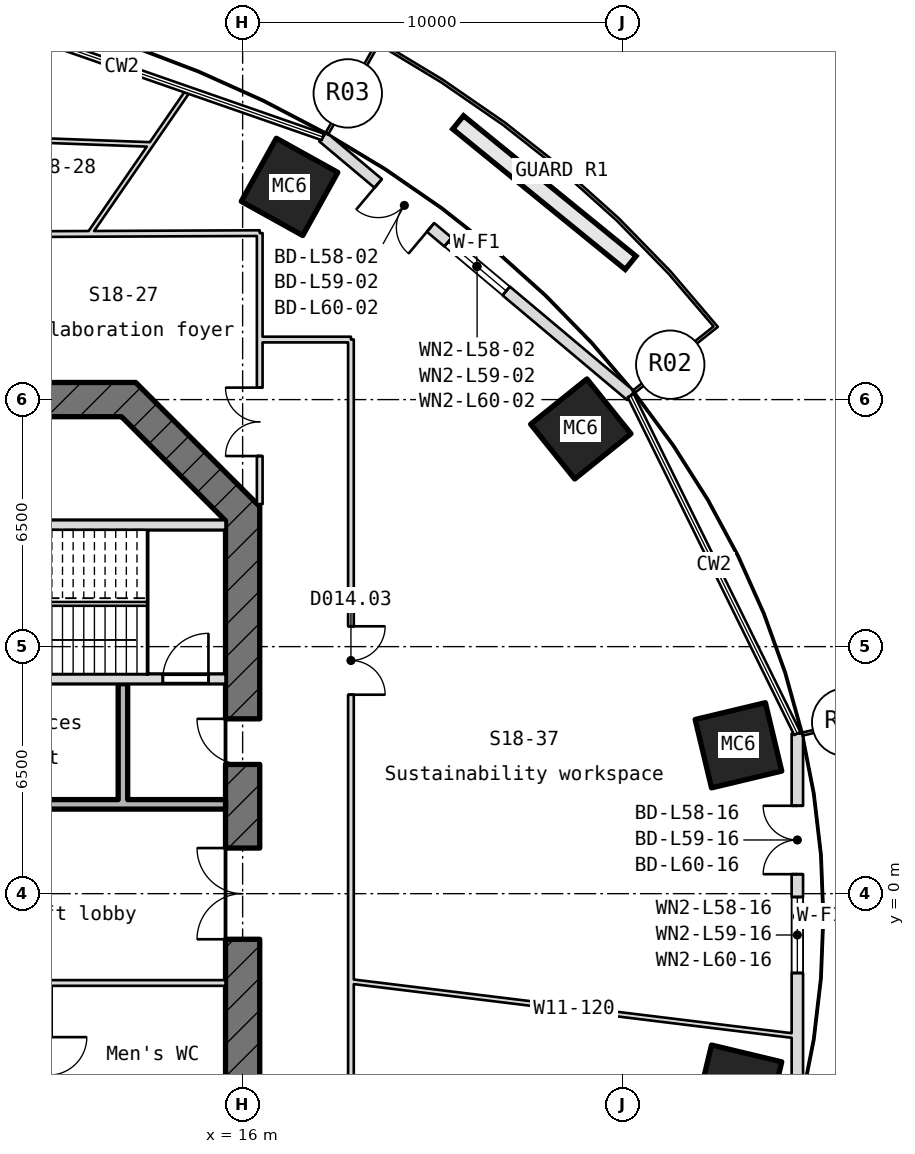
"""IFC4 building model, lengths in metres.
Left out: names, types, materials, properties, quantities, classifications, styles, units other than length and angle.
Written with IfcOpenShell. Run it as: python <this file> out.ifc"""

import sys

from ifc_helpers import new_model, si_unit, direction, frame, frame_2d, origin, origin_2d, place, context, subcontext, project, spatial, rectangle, hollow_rectangle, extrude, element, fill, save


model = new_model("IFC4")
c1 = context("Model", 3, precision=1e-05, world=origin(), true_north=direction((0.0, 1.0)))
c2 = subcontext(c1, "Body", "Model", "MODEL_VIEW")
j1 = project(units=[si_unit("LENGTHUNIT", "METRE"), si_unit("PLANEANGLEUNIT", "RADIAN")], contexts=[c1])
p1 = place(None, origin())
s1 = spatial("IfcSite", under=j1, at=p1, CompositionType="ELEMENT")
p2 = place(p1, origin())
s2 = spatial("IfcBuilding", under=s1, at=p2, CompositionType="ELEMENT")
p3 = place(p2, frame((0.0, 0.0, 260.65)))
s3 = spatial("IfcBuildingStorey", under=s2, at=p3, CompositionType="ELEMENT", Elevation=260.65)
for number, where, z_axis, x_axis in (
    (1, (29.047, 3.904, -0.18), (0.0, 0.0, 1.0), (0.233, -0.973, 0.0)),
    (2, (24.899, 12.227, -0.18), (0.0, 0.0, 1.0), (0.627, -0.779, 0.0)),
    (3, (17.234, 18.597, -0.18), (0.0, 0.0, 1.0), (0.874, -0.485, 0.0)),
    (4, (29.047, -5.104, -0.18), (0.0, 0.0, 1.0), (-0.233, -0.973, 0.0)),
):
    element("IfcColumn", number, at=place(p3, frame(where, z_axis=z_axis, x_axis=x_axis)), inside=s3, PredefinedType="COLUMN", context=c2, shape_type="SweptSolid", body=[
        extrude(hollow_rectangle(XDim=1.85, YDim=1.9, WallThickness=0.065, at=origin_2d()), origin(), (0.0, 0.0, 1.0), 4.15),
    ])
p4 = place(p3, frame((26.213, 13.105, 0.0), z_axis=(0.0, 0.0, 1.0), x_axis=(-0.765648495003, 0.643259187342, 0.0)))
e5 = element("IfcWall", 5, at=p4, inside=s3, PredefinedType="SOLIDWALL", context=c2, shape_type="SweptSolid", body=[
    extrude(rectangle(XDim=10.58, YDim=0.3, at=frame_2d((5.29, 0.0))), origin(), (0.0, 0.0, 1.0), 3.97),
])
p5 = place(p4, frame((6.88, 0.0, 0.0)))
e6 = element("IfcOpeningElement", 6, at=p5, cuts=e5, PredefinedType="OPENING", context=c2, shape_type="SweptSolid", body=[
    extrude(rectangle(XDim=1.8, YDim=2.4, at=frame_2d((0.9, 1.2))), frame((0.0, 0.16, 0.0), z_axis=(0.0, -1.0, 0.0), x_axis=(1.0, 0.0, 0.0)), (0.0, 0.0, 1.0), 0.32),
])
p6 = place(p4, frame((4.28, 0.0, 0.9)))
e7 = element("IfcOpeningElement", 7, at=p6, cuts=e5, PredefinedType="OPENING", context=c2, shape_type="SweptSolid", body=[
    extrude(rectangle(XDim=2.0, YDim=1.5, at=frame_2d((1.0, 0.75))), frame((0.0, 0.16, 0.0), z_axis=(0.0, -1.0, 0.0), x_axis=(1.0, 0.0, 0.0)), (0.0, 0.0, 1.0), 0.32),
])
p7 = place(p3, frame((30.597, -5.413, 0.0), z_axis=(0.0, 0.0, 1.0), x_axis=(0.0, 1.0, 0.0)))
e8 = element("IfcWall", 8, at=p7, inside=s3, PredefinedType="SOLIDWALL", context=c2, shape_type="SweptSolid", body=[
    extrude(rectangle(XDim=9.625, YDim=0.3, at=frame_2d((4.812, 0.0))), origin(), (0.0, 0.0, 1.0), 3.97),
])
p8 = place(p7, frame((5.925, 0.0, 0.0)))
e9 = element("IfcOpeningElement", 9, at=p8, cuts=e8, PredefinedType="OPENING", context=c2, shape_type="SweptSolid", body=[
    extrude(rectangle(XDim=1.8, YDim=2.4, at=frame_2d((0.9, 1.2))), frame((0.0, 0.16, 0.0), z_axis=(0.0, -1.0, 0.0), x_axis=(1.0, 0.0, 0.0)), (0.0, 0.0, 1.0), 0.32),
])
p9 = place(p7, frame((3.325, 0.0, 0.9)))
e10 = element("IfcOpeningElement", 10, at=p9, cuts=e8, PredefinedType="OPENING", context=c2, shape_type="SweptSolid", body=[
    extrude(rectangle(XDim=2.0, YDim=1.5, at=frame_2d((1.0, 0.75))), frame((0.0, 0.16, 0.0), z_axis=(0.0, -1.0, 0.0), x_axis=(1.0, 0.0, 0.0)), (0.0, 0.0, 1.0), 0.32),
])
p10 = place(p3, frame((16.0, -10.186, -0.18), z_axis=(0.0, 0.0, 1.0), x_axis=(0.0, 1.0, 0.0)))
e11 = element("IfcWall", 11, at=p10, inside=s3, PredefinedType="SHEAR", context=c2, shape_type="SweptSolid", body=[
    extrude(rectangle(XDim=20.373, YDim=0.9, at=frame_2d((10.186, 0.0))), origin(), (0.0, 0.0, 1.0), 4.15),
])
p11 = place(p10, frame((8.986, 0.0, 0.18)))
e12 = element("IfcOpeningElement", 12, at=p11, cuts=e11, PredefinedType="OPENING", context=c2, shape_type="SweptSolid", body=[
    extrude(rectangle(XDim=2.4, YDim=2.1, at=frame_2d((1.2, 1.05))), frame((0.0, 0.46, 0.0), z_axis=(0.0, -1.0, 0.0), x_axis=(1.0, 0.0, 0.0)), (0.0, 0.0, 1.0), 0.92),
])
p12 = place(p10, frame((13.586, 0.0, 0.18)))
e13 = element("IfcOpeningElement", 13, at=p12, cuts=e11, PredefinedType="OPENING", context=c2, shape_type="SweptSolid", body=[
    extrude(rectangle(XDim=1.2, YDim=2.1, at=frame_2d((0.6, 1.05))), frame((0.0, 0.46, 0.0), z_axis=(0.0, -1.0, 0.0), x_axis=(1.0, 0.0, 0.0)), (0.0, 0.0, 1.0), 0.92),
])
p13 = place(p3, frame((16.132, 9.868, -0.18), z_axis=(0.0, 0.0, 1.0), x_axis=(-0.707106781187, 0.707106781187, 0.0)))
e14 = element("IfcWall", 14, at=p13, inside=s3, PredefinedType="SHEAR", context=c2, shape_type="SweptSolid", body=[
    extrude(rectangle(XDim=4.615, YDim=0.9, at=frame_2d((2.308, 0.0))), origin(), (0.0, 0.0, 1.0), 4.15),
])
p14 = place(p3, frame((13.186, 13.0, -0.18), z_axis=(0.0, 0.0, 1.0), x_axis=(-1.0, 0.0, 0.0)))
e15 = element("IfcWall", 15, at=p14, inside=s3, PredefinedType="SHEAR", context=c2, shape_type="SweptSolid", body=[
    extrude(rectangle(XDim=26.373, YDim=0.9, at=frame_2d((13.186, 0.0))), origin(), (0.0, 0.0, 1.0), 4.15),
])
p15 = place(p14, frame((16.993, 0.0, 0.18)))
e16 = element("IfcOpeningElement", 16, at=p15, cuts=e15, PredefinedType="OPENING", context=c2, shape_type="SweptSolid", body=[
    extrude(rectangle(XDim=1.0, YDim=2.1, at=frame_2d((0.5, 1.05))), frame((0.0, 0.46, 0.0), z_axis=(0.0, -1.0, 0.0), x_axis=(1.0, 0.0, 0.0)), (0.0, 0.0, 1.0), 0.92),
])
p16 = place(p14, frame((4.179, 0.0, 0.18)))
e17 = element("IfcOpeningElement", 17, at=p16, cuts=e15, PredefinedType="OPENING", context=c2, shape_type="SweptSolid", body=[
    extrude(rectangle(XDim=1.0, YDim=2.1, at=frame_2d((0.5, 1.05))), frame((0.0, 0.46, 0.0), z_axis=(0.0, -1.0, 0.0), x_axis=(1.0, 0.0, 0.0)), (0.0, 0.0, 1.0), 0.92),
])
p17 = place(p3, frame((8.4, -2.35, 0.0), z_axis=(0.0, 0.0, 1.0), x_axis=(1.0, 0.0, 0.0)))
e18 = element("IfcWall", 18, at=p17, inside=s3, PredefinedType="PARTITIONING", context=c2, shape_type="SweptSolid", body=[
    extrude(rectangle(XDim=7.15, YDim=0.15, at=frame_2d((3.575, 0.0))), origin(), (0.0, 0.0, 1.0), 3.97),
])
p18 = place(p3, frame((8.4, 2.35, 0.0), z_axis=(0.0, 0.0, 1.0), x_axis=(1.0, 0.0, 0.0)))
e19 = element("IfcWall", 19, at=p18, inside=s3, PredefinedType="STANDARD", context=c2, shape_type="SweptSolid", body=[
    extrude(rectangle(XDim=7.15, YDim=0.25, at=frame_2d((3.575, 0.0))), origin(), (0.0, 0.0, 1.0), 3.97),
])
p19 = place(p3, frame((8.55, 5.65, -0.18), z_axis=(0.0, 0.0, 1.0), x_axis=(1.0, 0.0, 0.0)))
e20 = element("IfcWall", 20, at=p19, inside=s3, PredefinedType="SHEAR", context=c2, shape_type="SweptSolid", body=[
    extrude(rectangle(XDim=7.0, YDim=0.25, at=frame_2d((3.5, 0.0))), origin(), (0.0, 0.0, 1.0), 4.15),
])
p20 = place(p19, frame((5.35, 0.0, 0.18)))
e21 = element("IfcOpeningElement", 21, at=p20, cuts=e20, PredefinedType="OPENING", context=c2, shape_type="SweptSolid", body=[
    extrude(rectangle(XDim=1.2, YDim=2.1, at=frame_2d((0.6, 1.05))), frame((0.0, 0.135, 0.0), z_axis=(0.0, -1.0, 0.0), x_axis=(1.0, 0.0, 0.0)), (0.0, 0.0, 1.0), 0.27),
])
p21 = place(p3, frame((8.55, 9.7, -0.18), z_axis=(0.0, 0.0, 1.0), x_axis=(1.0, 0.0, 0.0)))
e22 = element("IfcWall", 22, at=p21, inside=s3, PredefinedType="SHEAR", context=c2, shape_type="SweptSolid", body=[
    extrude(rectangle(XDim=7.0, YDim=0.25, at=frame_2d((3.5, 0.0))), origin(), (0.0, 0.0, 1.0), 4.15),
])
p22 = place(p3, frame((12.85, 2.475, 0.0), z_axis=(0.0, 0.0, 1.0), x_axis=(0.0, 1.0, 0.0)))
e23 = element("IfcWall", 23, at=p22, inside=s3, PredefinedType="STANDARD", context=c2, shape_type="SweptSolid", body=[
    extrude(rectangle(XDim=3.05, YDim=0.25, at=frame_2d((1.525, 0.0))), origin(), (0.0, 0.0, 1.0), 3.97),
])
p23 = place(p3, frame((-14.001, 17.25, 0.0), z_axis=(0.0, 0.0, 1.0), x_axis=(0.999990800936, 0.004289294132, 0.0)))
e24 = element("IfcWall", 24, at=p23, inside=s3, PredefinedType="PARTITIONING", context=c2, shape_type="SweptSolid", body=[
    extrude(rectangle(XDim=30.451, YDim=0.15, at=frame_2d((15.226, 0.0))), origin(), (0.0, 0.0, 1.0), 3.97),
])
p24 = place(p23, frame((22.844, 0.0, 0.0)))
e25 = element("IfcOpeningElement", 25, at=p24, cuts=e24, PredefinedType="OPENING", context=c2, shape_type="SweptSolid", body=[
    extrude(rectangle(XDim=0.95, YDim=2.1, at=frame_2d((0.475, 1.05))), frame((0.0, 0.085, 0.0), z_axis=(0.0, -1.0, 0.0), x_axis=(1.0, 0.0, 0.0)), (0.0, 0.0, 1.0), 0.17),
])
p25 = place(p23, frame((17.576, 0.0, 0.0)))
e26 = element("IfcOpeningElement", 26, at=p25, cuts=e24, PredefinedType="OPENING", context=c2, shape_type="SweptSolid", body=[
    extrude(rectangle(XDim=0.95, YDim=2.1, at=frame_2d((0.475, 1.05))), frame((0.0, 0.085, 0.0), z_axis=(0.0, -1.0, 0.0), x_axis=(1.0, 0.0, 0.0)), (0.0, 0.0, 1.0), 0.17),
])
p26 = place(p23, frame((3.318, 0.0, 0.0)))
e27 = element("IfcOpeningElement", 27, at=p26, cuts=e24, PredefinedType="OPENING", context=c2, shape_type="SweptSolid", body=[
    extrude(rectangle(XDim=1.8, YDim=2.1, at=frame_2d((0.9, 1.05))), frame((0.0, 0.085, 0.0), z_axis=(0.0, -1.0, 0.0), x_axis=(1.0, 0.0, 0.0)), (0.0, 0.0, 1.0), 0.17),
])
p27 = place(p3, frame((11.981, 17.38, 0.0), z_axis=(0.0, 0.0, 1.0), x_axis=(0.567580608416, 0.82331783228, 0.0)))
e28 = element("IfcWall", 28, at=p27, inside=s3, PredefinedType="PARTITIONING", context=c2, shape_type="SweptSolid", body=[
    extrude(rectangle(XDim=4.569, YDim=0.12, at=frame_2d((2.285, 0.0))), origin(), (0.0, 0.0, 1.0), 3.97),
])
p28 = place(p3, frame((13.589, 19.712, 0.0), z_axis=(0.0, 0.0, 1.0), x_axis=(-0.999313711309, 0.037041954465, 0.0)))
e29 = element("IfcWall", 29, at=p28, inside=s3, PredefinedType="PARTITIONING", context=c2, shape_type="SweptSolid", body=[
    extrude(rectangle(XDim=11.923, YDim=0.12, at=frame_2d((5.961, 0.0))), origin(), (0.0, 0.0, 1.0), 3.97),
])
p29 = place(p3, frame((16.45, 10.25, 0.0), z_axis=(0.0, 0.0, 1.0), x_axis=(0.0, 1.0, 0.0)))
e30 = element("IfcWall", 30, at=p29, inside=s3, PredefinedType="PARTITIONING", context=c2, shape_type="SweptSolid", body=[
    extrude(rectangle(XDim=7.13, YDim=0.15, at=frame_2d((3.565, 0.0))), origin(), (0.0, 0.0, 1.0), 3.97),
])
p30 = place(p29, frame((1.265, 0.0, 0.0)))
e31 = element("IfcOpeningElement", 31, at=p30, cuts=e30, PredefinedType="OPENING", context=c2, shape_type="SweptSolid", body=[
    extrude(rectangle(XDim=1.8, YDim=2.1, at=frame_2d((0.9, 1.05))), frame((0.0, 0.085, 0.0), z_axis=(0.0, -1.0, 0.0), x_axis=(1.0, 0.0, 0.0)), (0.0, 0.0, 1.0), 0.17),
])
p31 = place(p3, frame((16.45, 14.58, 0.0), z_axis=(0.0, 0.0, 1.0), x_axis=(1.0, 0.0, 0.0)))
e32 = element("IfcWall", 32, at=p31, inside=s3, PredefinedType="PARTITIONING", context=c2, shape_type="SweptSolid", body=[
    extrude(rectangle(XDim=2.4, YDim=0.15, at=frame_2d((1.2, 0.0))), origin(), (0.0, 0.0, 1.0), 3.97),
])
p32 = place(p3, frame((18.85, -2.31, 0.0), z_axis=(0.0, 0.0, 1.0), x_axis=(0.99257271965, -0.121652769002, 0.0)))
e33 = element("IfcWall", 33, at=p32, inside=s3, PredefinedType="PARTITIONING", context=c2, shape_type="SweptSolid", body=[
    extrude(rectangle(XDim=11.834, YDim=0.12, at=frame_2d((5.917, 0.0))), origin(), (0.0, 0.0, 1.0), 3.97),
])
p33 = place(p3, frame((18.85, 14.58, 0.0), z_axis=(0.0, 0.0, 1.0), x_axis=(0.0, -1.0, 0.0)))
e34 = element("IfcWall", 34, at=p33, inside=s3, PredefinedType="PARTITIONING", context=c2, shape_type="SweptSolid", body=[
    extrude(rectangle(XDim=30.73, YDim=0.15, at=frame_2d((15.365, 0.0))), origin(), (0.0, 0.0, 1.0), 3.97),
])
p34 = place(p33, frame((7.545, 0.0, 0.0)))
e35 = element("IfcOpeningElement", 35, at=p34, cuts=e34, PredefinedType="OPENING", context=c2, shape_type="SweptSolid", body=[
    extrude(rectangle(XDim=1.8, YDim=2.1, at=frame_2d((0.9, 1.05))), frame((0.0, 0.085, 0.0), z_axis=(0.0, -1.0, 0.0), x_axis=(1.0, 0.0, 0.0)), (0.0, 0.0, 1.0), 0.17),
])
p35 = place(p5, origin())
e36 = element("IfcDoor", 36, at=p35, inside=s3, OperationType="SINGLE_SWING_LEFT", PredefinedType="DOOR", context=c2, shape_type="SweptSolid", body=[
    extrude(rectangle(XDim=1.8, YDim=2.4, at=frame_2d((0.9, 1.2))), frame((0.0, 0.025, 0.0), z_axis=(0.0, -1.0, 0.0), x_axis=(1.0, 0.0, 0.0)), (0.0, 0.0, 1.0), 0.05),
])
fill(e6, e36)
p36 = place(p6, origin())
e37 = element("IfcWindow", 37, at=p36, inside=s3, PartitioningType="SINGLE_PANEL", PredefinedType="WINDOW", context=c2, shape_type="SweptSolid", body=[
    extrude(rectangle(XDim=2.0, YDim=1.5, at=frame_2d((1.0, 0.75))), frame((0.0, 0.03, 0.0), z_axis=(0.0, -1.0, 0.0), x_axis=(1.0, 0.0, 0.0)), (0.0, 0.0, 1.0), 0.06),
])
fill(e7, e37)
p37 = place(p8, origin())
e38 = element("IfcDoor", 38, at=p37, inside=s3, OperationType="SINGLE_SWING_LEFT", PredefinedType="DOOR", context=c2, shape_type="SweptSolid", body=[
    extrude(rectangle(XDim=1.8, YDim=2.4, at=frame_2d((0.9, 1.2))), frame((0.0, 0.025, 0.0), z_axis=(0.0, -1.0, 0.0), x_axis=(1.0, 0.0, 0.0)), (0.0, 0.0, 1.0), 0.05),
])
fill(e9, e38)
p38 = place(p9, origin())
e39 = element("IfcWindow", 39, at=p38, inside=s3, PartitioningType="SINGLE_PANEL", PredefinedType="WINDOW", context=c2, shape_type="SweptSolid", body=[
    extrude(rectangle(XDim=2.0, YDim=1.5, at=frame_2d((1.0, 0.75))), frame((0.0, 0.03, 0.0), z_axis=(0.0, -1.0, 0.0), x_axis=(1.0, 0.0, 0.0)), (0.0, 0.0, 1.0), 0.06),
])
fill(e10, e39)
p39 = place(p20, origin())
e40 = element("IfcDoor", 40, at=p39, inside=s3, OperationType="SINGLE_SWING_RIGHT", PredefinedType="DOOR", context=c2, shape_type="SweptSolid", body=[
    extrude(rectangle(XDim=1.2, YDim=2.1, at=frame_2d((0.6, 1.05))), frame((0.0, 0.025, 0.0), z_axis=(0.0, -1.0, 0.0), x_axis=(1.0, 0.0, 0.0)), (0.0, 0.0, 1.0), 0.05),
])
fill(e21, e40)
p40 = place(p11, origin())
e41 = element("IfcDoor", 41, at=p40, inside=s3, OperationType="DOUBLE_DOOR_SINGLE_SWING", PredefinedType="DOOR", context=c2, shape_type="SweptSolid", body=[
    extrude(rectangle(XDim=2.4, YDim=2.1, at=frame_2d((1.2, 1.05))), frame((0.0, 0.025, 0.0), z_axis=(0.0, -1.0, 0.0), x_axis=(1.0, 0.0, 0.0)), (0.0, 0.0, 1.0), 0.05),
])
fill(e12, e41)
p41 = place(p12, origin())
e42 = element("IfcDoor", 42, at=p41, inside=s3, OperationType="SINGLE_SWING_RIGHT", PredefinedType="DOOR", context=c2, shape_type="SweptSolid", body=[
    extrude(rectangle(XDim=1.2, YDim=2.1, at=frame_2d((0.6, 1.05))), frame((0.0, 0.025, 0.0), z_axis=(0.0, -1.0, 0.0), x_axis=(1.0, 0.0, 0.0)), (0.0, 0.0, 1.0), 0.05),
])
fill(e13, e42)
p42 = place(p34, origin())
e43 = element("IfcDoor", 43, at=p42, inside=s3, OperationType="DOUBLE_DOOR_SINGLE_SWING", PredefinedType="DOOR", context=c2, shape_type="SweptSolid", body=[
    extrude(rectangle(XDim=1.8, YDim=2.1, at=frame_2d((0.9, 1.05))), frame((0.0, 0.025, 0.0), z_axis=(0.0, -1.0, 0.0), x_axis=(1.0, 0.0, 0.0)), (0.0, 0.0, 1.0), 0.05),
])
fill(e35, e43)
p43 = place(p30, origin())
e44 = element("IfcDoor", 44, at=p43, inside=s3, OperationType="DOUBLE_DOOR_SINGLE_SWING", PredefinedType="DOOR", context=c2, shape_type="SweptSolid", body=[
    extrude(rectangle(XDim=1.8, YDim=2.1, at=frame_2d((0.9, 1.05))), frame((0.0, 0.025, 0.0), z_axis=(0.0, -1.0, 0.0), x_axis=(1.0, 0.0, 0.0)), (0.0, 0.0, 1.0), 0.05),
])
fill(e31, e44)
save(model, sys.argv[1])
